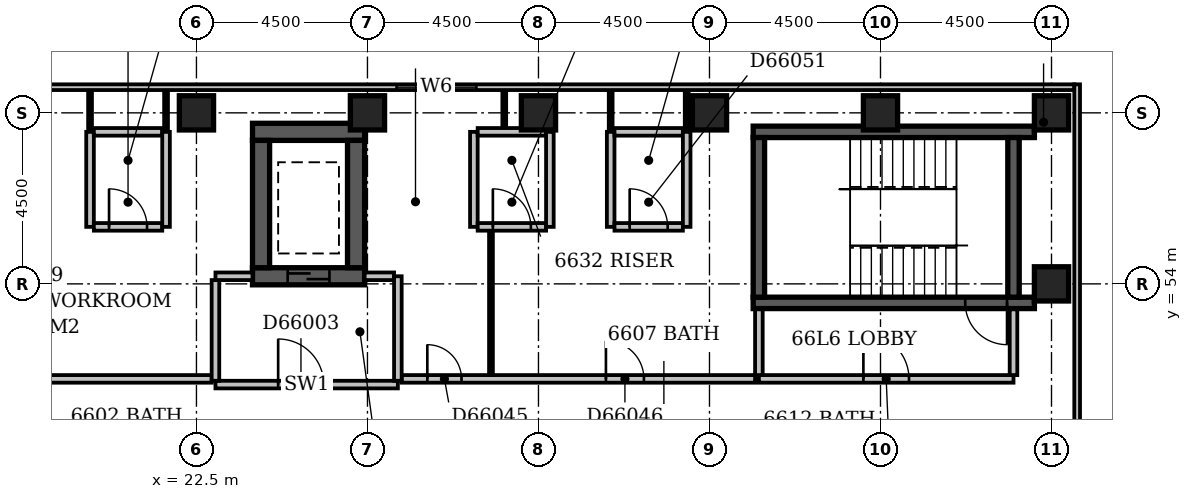
"""IFC4 building model, lengths in metres.
Left out: names, types, materials, properties, quantities, classifications, styles, units other than length and angle.
Written with IfcOpenShell. Run it as: python <this file> out.ifc"""

import sys

from ifc_helpers import new_model, si_unit, direction, frame, frame_2d, origin, origin_2d, place, context, subcontext, project, spatial, rectangle, extrude, element, fill, save


model = new_model("IFC4")
c1 = context("Model", 3, precision=1e-05, world=origin(), true_north=direction((0.0, 1.0)))
c2 = subcontext(c1, "Body", "Model", "MODEL_VIEW")
j1 = project(units=[si_unit("LENGTHUNIT", "METRE"), si_unit("PLANEANGLEUNIT", "RADIAN")], contexts=[c1])
p1 = place(None, origin())
s1 = spatial("IfcSite", under=j1, at=p1, CompositionType="ELEMENT")
p2 = place(p1, origin())
s2 = spatial("IfcBuilding", under=s1, at=p2, CompositionType="ELEMENT")
p3 = place(p2, frame((0.0, 0.0, 254.6)))
s3 = spatial("IfcBuildingStorey", under=s2, at=p3, CompositionType="ELEMENT", Elevation=254.6)
p4 = place(p3, frame((23.975, 54.2, -0.3), z_axis=(0.0, 0.0, 1.0), x_axis=(1.0, 0.0, 0.0)))
e1 = element("IfcWall", 1, at=p4, inside=s3, PredefinedType="SHEAR", context=c2, shape_type="SweptSolid", body=[
    extrude(rectangle(XDim=2.95, YDim=0.45, at=frame_2d((1.475, 0.0))), origin(), (0.0, 0.0, 1.0), 3.45),
])
p5 = place(p4, frame((0.925, 0.0, 0.3)))
e2 = element("IfcOpeningElement", 2, at=p5, cuts=e1, PredefinedType="OPENING", context=c2, shape_type="SweptSolid", body=[
    extrude(rectangle(XDim=1.1, YDim=2.1, at=frame_2d((0.55, 1.05))), frame((0.0, 0.237, 0.0), z_axis=(0.0, -1.0, 0.0), x_axis=(1.0, 0.0, 0.0)), (0.0, 0.0, 1.0), 0.474),
])
p6 = place(p3, frame((23.975, 58.0, -0.3), z_axis=(0.0, 0.0, 1.0), x_axis=(1.0, 0.0, 0.0)))
e3 = element("IfcWall", 3, at=p6, inside=s3, PredefinedType="SHEAR", context=c2, shape_type="SweptSolid", body=[
    extrude(rectangle(XDim=2.95, YDim=0.45, at=frame_2d((1.475, 0.0))), origin(), (0.0, 0.0, 1.0), 3.45),
])
for number, where, z_axis, x_axis in (
    (4, (24.2, 54.425, -0.3), (0.0, 0.0, 1.0), (0.0, 1.0, 0.0)),
    (5, (26.7, 54.425, -0.3), (0.0, 0.0, 1.0), (0.0, 1.0, 0.0)),
):
    element("IfcWall", number, at=place(p3, frame(where, z_axis=z_axis, x_axis=x_axis)), inside=s3, PredefinedType="SHEAR", context=c2, shape_type="SweptSolid", body=[
        extrude(rectangle(XDim=3.35, YDim=0.45, at=frame_2d((1.675, 0.0))), origin(), (0.0, 0.0, 1.0), 3.45),
    ])
p7 = place(p3, frame((37.15, 53.5, -0.3), z_axis=(0.0, 0.0, 1.0), x_axis=(1.0, 0.0, 0.0)))
e6 = element("IfcWall", 6, at=p7, inside=s3, PredefinedType="SHEAR", context=c2, shape_type="SweptSolid", body=[
    extrude(rectangle(XDim=7.4, YDim=0.3, at=frame_2d((3.7, 0.0))), origin(), (0.0, 0.0, 1.0), 3.45),
])
p8 = place(p7, frame((5.58, 0.0, 0.3)))
e7 = element("IfcOpeningElement", 7, at=p8, cuts=e6, PredefinedType="OPENING", context=c2, shape_type="SweptSolid", body=[
    extrude(rectangle(XDim=1.1, YDim=2.1, at=frame_2d((0.55, 1.05))), frame((0.0, 0.162, 0.0), z_axis=(0.0, -1.0, 0.0), x_axis=(1.0, 0.0, 0.0)), (0.0, 0.0, 1.0), 0.324),
])
p9 = place(p3, frame((37.15, 58.0, -0.3), z_axis=(0.0, 0.0, 1.0), x_axis=(1.0, 0.0, 0.0)))
e8 = element("IfcWall", 8, at=p9, inside=s3, PredefinedType="SHEAR", context=c2, shape_type="SweptSolid", body=[
    extrude(rectangle(XDim=7.4, YDim=0.3, at=frame_2d((3.7, 0.0))), origin(), (0.0, 0.0, 1.0), 3.45),
])
for number, where, z_axis, x_axis in (
    (9, (37.3, 53.65, -0.3), (0.0, 0.0, 1.0), (0.0, 1.0, 0.0)),
    (10, (44.0, 53.65, -0.3), (0.0, 0.0, 1.0), (0.0, 1.0, 0.0)),
):
    element("IfcWall", number, at=place(p3, frame(where, z_axis=z_axis, x_axis=x_axis)), inside=s3, PredefinedType="SHEAR", context=c2, shape_type="SweptSolid", body=[
        extrude(rectangle(XDim=4.2, YDim=0.3, at=frame_2d((2.1, 0.0))), origin(), (0.0, 0.0, 1.0), 3.45),
    ])
for number, where, z_axis, x_axis in (
    (11, (45.0, 54.0, -0.3), (0.0, 0.0, 1.0), (1.0, 0.0, 0.0)),
    (12, (22.5, 58.5, -0.3), (0.0, 0.0, 1.0), (1.0, 0.0, 0.0)),
    (13, (27.0, 58.5, -0.3), (0.0, 0.0, 1.0), (1.0, 0.0, 0.0)),
    (14, (31.5, 58.5, -0.3), (0.0, 0.0, 1.0), (1.0, 0.0, 0.0)),
    (15, (36.0, 58.5, -0.3), (0.0, 0.0, 1.0), (1.0, 0.0, 0.0)),
    (16, (40.5, 58.5, -0.3), (0.0, 0.0, 1.0), (1.0, 0.0, 0.0)),
    (17, (45.0, 58.5, -0.3), (0.0, 0.0, 1.0), (1.0, 0.0, 0.0)),
):
    element("IfcColumn", number, at=place(p3, frame(where, z_axis=z_axis, x_axis=x_axis)), inside=s3, PredefinedType="COLUMN", context=c2, shape_type="SweptSolid", body=[
        extrude(rectangle(XDim=0.9, YDim=0.9, at=origin_2d()), origin(), (0.0, 0.0, 1.0), 3.45),
    ])
p10 = place(p3, frame((45.675, 39.9, 0.0), z_axis=(0.0, 0.0, 1.0), x_axis=(0.0, 1.0, 0.0)))
e18 = element("IfcWall", 18, at=p10, inside=s3, PredefinedType="STANDARD", context=c2, shape_type="SweptSolid", body=[
    extrude(rectangle(XDim=19.35, YDim=0.15, at=frame_2d((9.675, 0.0))), origin(), (0.0, 0.0, 1.0), 2.7),
])
p11 = place(p10, frame((1.65, 0.0, 0.6)))
e19 = element("IfcOpeningElement", 19, at=p11, cuts=e18, PredefinedType="OPENING", context=c2, shape_type="SweptSolid", body=[
    extrude(rectangle(XDim=2.4, YDim=1.8, at=frame_2d((1.2, 0.9))), frame((0.0, 0.087, 0.0), z_axis=(0.0, -1.0, 0.0), x_axis=(1.0, 0.0, 0.0)), (0.0, 0.0, 1.0), 0.174),
])
p12 = place(p10, frame((6.15, 0.0, 0.6)))
e20 = element("IfcOpeningElement", 20, at=p12, cuts=e18, PredefinedType="OPENING", context=c2, shape_type="SweptSolid", body=[
    extrude(rectangle(XDim=2.4, YDim=1.8, at=frame_2d((1.2, 0.9))), frame((0.0, 0.087, 0.0), z_axis=(0.0, -1.0, 0.0), x_axis=(1.0, 0.0, 0.0)), (0.0, 0.0, 1.0), 0.174),
])
p13 = place(p3, frame((45.6, 59.175, 0.0), z_axis=(0.0, 0.0, 1.0), x_axis=(-1.0, 0.0, 0.0)))
e21 = element("IfcWall", 21, at=p13, inside=s3, PredefinedType="STANDARD", context=c2, shape_type="SweptSolid", body=[
    extrude(rectangle(XDim=46.35, YDim=0.15, at=frame_2d((23.175, 0.0))), origin(), (0.0, 0.0, 1.0), 2.7),
])
p14 = place(p13, frame((15.734, 0.0, 0.6)))
e22 = element("IfcOpeningElement", 22, at=p14, cuts=e21, PredefinedType="OPENING", context=c2, shape_type="SweptSolid", body=[
    extrude(rectangle(XDim=2.1, YDim=1.8, at=frame_2d((1.05, 0.9))), frame((0.0, 0.087, 0.0), z_axis=(0.0, -1.0, 0.0), x_axis=(1.0, 0.0, 0.0)), (0.0, 0.0, 1.0), 0.174),
])
p15 = place(p3, frame((23.0, 51.35, 0.0), z_axis=(0.0, 0.0, 1.0), x_axis=(1.0, 0.0, 0.0)))
e23 = element("IfcWall", 23, at=p15, inside=s3, PredefinedType="PARTITIONING", context=c2, shape_type="SweptSolid", body=[
    extrude(rectangle(XDim=4.8, YDim=0.2, at=frame_2d((2.4, 0.0))), origin(), (0.0, 0.0, 1.0), 3.15),
])
p16 = place(p15, frame((1.65, 0.0, 0.0)))
e24 = element("IfcOpeningElement", 24, at=p16, cuts=e23, PredefinedType="OPENING", context=c2, shape_type="SweptSolid", body=[
    extrude(rectangle(XDim=1.2, YDim=2.1, at=frame_2d((0.6, 1.05))), frame((0.0, 0.112, 0.0), z_axis=(0.0, -1.0, 0.0), x_axis=(1.0, 0.0, 0.0)), (0.0, 0.0, 1.0), 0.224),
])
p17 = place(p3, frame((27.8, 51.45, 0.0), z_axis=(0.0, 0.0, 1.0), x_axis=(0.0, 1.0, 0.0)))
e25 = element("IfcWall", 25, at=p17, inside=s3, PredefinedType="PARTITIONING", context=c2, shape_type="SweptSolid", body=[
    extrude(rectangle(XDim=2.75, YDim=0.2, at=frame_2d((1.375, 0.0))), origin(), (0.0, 0.0, 1.0), 3.15),
])
p18 = place(p3, frame((23.0, 54.2, 0.0), z_axis=(0.0, 0.0, 1.0), x_axis=(1.0, 0.0, 0.0)))
e26 = element("IfcWall", 26, at=p18, inside=s3, PredefinedType="PARTITIONING", context=c2, shape_type="SweptSolid", body=[
    extrude(rectangle(XDim=0.975, YDim=0.2, at=frame_2d((0.488, 0.0))), origin(), (0.0, 0.0, 1.0), 3.15),
])
p19 = place(p3, frame((26.925, 54.2, 0.0), z_axis=(0.0, 0.0, 1.0), x_axis=(1.0, 0.0, 0.0)))
e27 = element("IfcWall", 27, at=p19, inside=s3, PredefinedType="PARTITIONING", context=c2, shape_type="SweptSolid", body=[
    extrude(rectangle(XDim=0.775, YDim=0.2, at=frame_2d((0.387, 0.0))), origin(), (0.0, 0.0, 1.0), 3.15),
])
p20 = place(p3, frame((23.0, 51.45, 0.0), z_axis=(0.0, 0.0, 1.0), x_axis=(0.0, 1.0, 0.0)))
e28 = element("IfcWall", 28, at=p20, inside=s3, PredefinedType="PARTITIONING", context=c2, shape_type="SweptSolid", body=[
    extrude(rectangle(XDim=2.65, YDim=0.2, at=frame_2d((1.325, 0.0))), origin(), (0.0, 0.0, 1.0), 3.15),
])
p21 = place(p3, frame((37.3, 51.5, 0.0), z_axis=(0.0, 0.0, 1.0), x_axis=(1.0, 0.0, 0.0)))
e29 = element("IfcWall", 29, at=p21, inside=s3, PredefinedType="PARTITIONING", context=c2, shape_type="SweptSolid", body=[
    extrude(rectangle(XDim=6.7, YDim=0.2, at=frame_2d((3.35, 0.0))), origin(), (0.0, 0.0, 1.0), 3.15),
])
p22 = place(p21, frame((2.75, 0.0, 0.0)))
e30 = element("IfcOpeningElement", 30, at=p22, cuts=e29, PredefinedType="OPENING", context=c2, shape_type="SweptSolid", body=[
    extrude(rectangle(XDim=1.2, YDim=2.1, at=frame_2d((0.6, 1.05))), frame((0.0, 0.112, 0.0), z_axis=(0.0, -1.0, 0.0), x_axis=(1.0, 0.0, 0.0)), (0.0, 0.0, 1.0), 0.224),
])
for number, where, z_axis, x_axis in (
    (31, (44.0, 51.6, 0.0), (0.0, 0.0, 1.0), (0.0, 1.0, 0.0)),
    (32, (37.3, 51.6, 0.0), (0.0, 0.0, 1.0), (0.0, 1.0, 0.0)),
):
    element("IfcWall", number, at=place(p3, frame(where, z_axis=z_axis, x_axis=x_axis)), inside=s3, PredefinedType="PARTITIONING", context=c2, shape_type="SweptSolid", body=[
        extrude(rectangle(XDim=1.73, YDim=0.2, at=frame_2d((0.865, 0.0))), origin(), (0.0, 0.0, 1.0), 3.15),
    ])
p23 = place(p3, frame((7.6, 51.5, 0.0), z_axis=(0.0, 0.0, 1.0), x_axis=(1.0, 0.0, 0.0)))
e33 = element("IfcWall", 33, at=p23, inside=s3, PredefinedType="PARTITIONING", context=c2, shape_type="SweptSolid", body=[
    extrude(rectangle(XDim=15.3, YDim=0.2, at=frame_2d((7.65, 0.0))), origin(), (0.0, 0.0, 1.0), 3.15),
])
p24 = place(p23, frame((2.075, 0.0, 0.0)))
e34 = element("IfcOpeningElement", 34, at=p24, cuts=e33, PredefinedType="OPENING", context=c2, shape_type="SweptSolid", body=[
    extrude(rectangle(XDim=1.0, YDim=2.1, at=frame_2d((0.5, 1.05))), frame((0.0, 0.112, 0.0), z_axis=(0.0, -1.0, 0.0), x_axis=(1.0, 0.0, 0.0)), (0.0, 0.0, 1.0), 0.224),
])
p25 = place(p23, frame((9.875, 0.0, 0.0)))
e35 = element("IfcOpeningElement", 35, at=p25, cuts=e33, PredefinedType="OPENING", context=c2, shape_type="SweptSolid", body=[
    extrude(rectangle(XDim=0.9, YDim=2.1, at=frame_2d((0.45, 1.05))), frame((0.0, 0.112, 0.0), z_axis=(0.0, -1.0, 0.0), x_axis=(1.0, 0.0, 0.0)), (0.0, 0.0, 1.0), 0.224),
])
p26 = place(p3, frame((27.9, 51.5, 0.0), z_axis=(0.0, 0.0, 1.0), x_axis=(1.0, 0.0, 0.0)))
e36 = element("IfcWall", 36, at=p26, inside=s3, PredefinedType="PARTITIONING", context=c2, shape_type="SweptSolid", body=[
    extrude(rectangle(XDim=9.3, YDim=0.2, at=frame_2d((4.65, 0.0))), origin(), (0.0, 0.0, 1.0), 3.15),
])
p27 = place(p26, frame((0.675, 0.0, 0.0)))
e37 = element("IfcOpeningElement", 37, at=p27, cuts=e36, PredefinedType="OPENING", context=c2, shape_type="SweptSolid", body=[
    extrude(rectangle(XDim=0.9, YDim=2.1, at=frame_2d((0.45, 1.05))), frame((0.0, 0.112, 0.0), z_axis=(0.0, -1.0, 0.0), x_axis=(1.0, 0.0, 0.0)), (0.0, 0.0, 1.0), 0.224),
])
p28 = place(p26, frame((5.375, 0.0, 0.0)))
e38 = element("IfcOpeningElement", 38, at=p28, cuts=e36, PredefinedType="OPENING", context=c2, shape_type="SweptSolid", body=[
    extrude(rectangle(XDim=1.0, YDim=2.1, at=frame_2d((0.5, 1.05))), frame((0.0, 0.112, 0.0), z_axis=(0.0, -1.0, 0.0), x_axis=(1.0, 0.0, 0.0)), (0.0, 0.0, 1.0), 0.224),
])
p29 = place(p3, frame((30.25, 51.6, 0.0), z_axis=(0.0, 0.0, 1.0), x_axis=(0.0, 1.0, 0.0)))
e39 = element("IfcWall", 39, at=p29, inside=s3, PredefinedType="PARTITIONING", context=c2, shape_type="SweptSolid", body=[
    extrude(rectangle(XDim=3.8, YDim=0.1, at=frame_2d((1.9, 0.0))), origin(), (0.0, 0.0, 1.0), 3.15),
])
p30 = place(p3, frame((19.7, 55.5, 0.0), z_axis=(0.0, 0.0, 1.0), x_axis=(0.0, 1.0, 0.0)))
e40 = element("IfcWall", 40, at=p30, inside=s3, PredefinedType="PARTITIONING", context=c2, shape_type="SweptSolid", body=[
    extrude(rectangle(XDim=2.5, YDim=0.2, at=frame_2d((1.25, 0.0))), origin(), (0.0, 0.0, 1.0), 3.15),
])
p31 = place(p3, frame((19.8, 55.5, 0.0), z_axis=(0.0, 0.0, 1.0), x_axis=(1.0, 0.0, 0.0)))
e41 = element("IfcWall", 41, at=p31, inside=s3, PredefinedType="PARTITIONING", context=c2, shape_type="SweptSolid", body=[
    extrude(rectangle(XDim=1.8, YDim=0.2, at=frame_2d((0.9, 0.0))), origin(), (0.0, 0.0, 1.0), 3.15),
])
p32 = place(p31, frame((0.4, 0.0, 0.0)))
e42 = element("IfcOpeningElement", 42, at=p32, cuts=e41, PredefinedType="OPENING", context=c2, shape_type="SweptSolid", body=[
    extrude(rectangle(XDim=1.0, YDim=2.1, at=frame_2d((0.5, 1.05))), frame((0.0, 0.112, 0.0), z_axis=(0.0, -1.0, 0.0), x_axis=(1.0, 0.0, 0.0)), (0.0, 0.0, 1.0), 0.224),
])
for number, where, z_axis, x_axis in (
    (43, (21.7, 55.5, 0.0), (0.0, 0.0, 1.0), (0.0, 1.0, 0.0)),
    (44, (29.8, 55.5, 0.0), (0.0, 0.0, 1.0), (0.0, 1.0, 0.0)),
):
    element("IfcWall", number, at=place(p3, frame(where, z_axis=z_axis, x_axis=x_axis)), inside=s3, PredefinedType="PARTITIONING", context=c2, shape_type="SweptSolid", body=[
        extrude(rectangle(XDim=2.5, YDim=0.2, at=frame_2d((1.25, 0.0))), origin(), (0.0, 0.0, 1.0), 3.15),
    ])
p33 = place(p3, frame((29.9, 55.5, 0.0), z_axis=(0.0, 0.0, 1.0), x_axis=(1.0, 0.0, 0.0)))
e45 = element("IfcWall", 45, at=p33, inside=s3, PredefinedType="PARTITIONING", context=c2, shape_type="SweptSolid", body=[
    extrude(rectangle(XDim=1.8, YDim=0.2, at=frame_2d((0.9, 0.0))), origin(), (0.0, 0.0, 1.0), 3.15),
])
p34 = place(p33, frame((0.4, 0.0, 0.0)))
e46 = element("IfcOpeningElement", 46, at=p34, cuts=e45, PredefinedType="OPENING", context=c2, shape_type="SweptSolid", body=[
    extrude(rectangle(XDim=1.0, YDim=2.1, at=frame_2d((0.5, 1.05))), frame((0.0, 0.112, 0.0), z_axis=(0.0, -1.0, 0.0), x_axis=(1.0, 0.0, 0.0)), (0.0, 0.0, 1.0), 0.224),
])
for number, where, z_axis, x_axis in (
    (47, (31.8, 55.5, 0.0), (0.0, 0.0, 1.0), (0.0, 1.0, 0.0)),
    (48, (33.4, 55.5, 0.0), (0.0, 0.0, 1.0), (0.0, 1.0, 0.0)),
):
    element("IfcWall", number, at=place(p3, frame(where, z_axis=z_axis, x_axis=x_axis)), inside=s3, PredefinedType="PARTITIONING", context=c2, shape_type="SweptSolid", body=[
        extrude(rectangle(XDim=2.5, YDim=0.2, at=frame_2d((1.25, 0.0))), origin(), (0.0, 0.0, 1.0), 3.15),
    ])
p35 = place(p3, frame((33.5, 55.5, 0.0), z_axis=(0.0, 0.0, 1.0), x_axis=(1.0, 0.0, 0.0)))
e49 = element("IfcWall", 49, at=p35, inside=s3, PredefinedType="PARTITIONING", context=c2, shape_type="SweptSolid", body=[
    extrude(rectangle(XDim=1.8, YDim=0.2, at=frame_2d((0.9, 0.0))), origin(), (0.0, 0.0, 1.0), 3.15),
])
p36 = place(p35, frame((0.4, 0.0, 0.0)))
e50 = element("IfcOpeningElement", 50, at=p36, cuts=e49, PredefinedType="OPENING", context=c2, shape_type="SweptSolid", body=[
    extrude(rectangle(XDim=1.0, YDim=2.1, at=frame_2d((0.5, 1.05))), frame((0.0, 0.112, 0.0), z_axis=(0.0, -1.0, 0.0), x_axis=(1.0, 0.0, 0.0)), (0.0, 0.0, 1.0), 0.224),
])
p37 = place(p3, frame((35.4, 55.5, 0.0), z_axis=(0.0, 0.0, 1.0), x_axis=(0.0, 1.0, 0.0)))
e51 = element("IfcWall", 51, at=p37, inside=s3, PredefinedType="PARTITIONING", context=c2, shape_type="SweptSolid", body=[
    extrude(rectangle(XDim=2.5, YDim=0.2, at=frame_2d((1.25, 0.0))), origin(), (0.0, 0.0, 1.0), 3.15),
])
p38 = place(p3, frame((19.7, 58.0, 0.0), z_axis=(0.0, 0.0, 1.0), x_axis=(0.0, 1.0, 0.0)))
e52 = element("IfcWall", 52, at=p38, inside=s3, PredefinedType="PARTITIONING", context=c2, shape_type="SweptSolid", body=[
    extrude(rectangle(XDim=1.1, YDim=0.1, at=frame_2d((0.55, 0.0))), origin(), (0.0, 0.0, 1.0), 3.15),
])
p39 = place(p3, frame((19.8, 58.0, 0.0), z_axis=(0.0, 0.0, 1.0), x_axis=(1.0, 0.0, 0.0)))
e53 = element("IfcWall", 53, at=p39, inside=s3, PredefinedType="PARTITIONING", context=c2, shape_type="SweptSolid", body=[
    extrude(rectangle(XDim=1.8, YDim=0.2, at=frame_2d((0.9, 0.0))), origin(), (0.0, 0.0, 1.0), 3.15),
])
p40 = place(p3, frame((21.7, 58.0, 0.0), z_axis=(0.0, 0.0, 1.0), x_axis=(0.0, 1.0, 0.0)))
e54 = element("IfcWall", 54, at=p40, inside=s3, PredefinedType="PARTITIONING", context=c2, shape_type="SweptSolid", body=[
    extrude(rectangle(XDim=1.1, YDim=0.1, at=frame_2d((0.55, 0.0))), origin(), (0.0, 0.0, 1.0), 3.15),
])
p41 = place(p3, frame((29.9, 58.0, 0.0), z_axis=(0.0, 0.0, 1.0), x_axis=(1.0, 0.0, 0.0)))
e55 = element("IfcWall", 55, at=p41, inside=s3, PredefinedType="PARTITIONING", context=c2, shape_type="SweptSolid", body=[
    extrude(rectangle(XDim=1.8, YDim=0.2, at=frame_2d((0.9, 0.0))), origin(), (0.0, 0.0, 1.0), 3.15),
])
p42 = place(p3, frame((33.4, 58.0, 0.0), z_axis=(0.0, 0.0, 1.0), x_axis=(0.0, 1.0, 0.0)))
e56 = element("IfcWall", 56, at=p42, inside=s3, PredefinedType="PARTITIONING", context=c2, shape_type="SweptSolid", body=[
    extrude(rectangle(XDim=1.1, YDim=0.1, at=frame_2d((0.55, 0.0))), origin(), (0.0, 0.0, 1.0), 3.15),
])
p43 = place(p3, frame((33.5, 58.0, 0.0), z_axis=(0.0, 0.0, 1.0), x_axis=(1.0, 0.0, 0.0)))
e57 = element("IfcWall", 57, at=p43, inside=s3, PredefinedType="PARTITIONING", context=c2, shape_type="SweptSolid", body=[
    extrude(rectangle(XDim=1.8, YDim=0.2, at=frame_2d((0.9, 0.0))), origin(), (0.0, 0.0, 1.0), 3.15),
])
p44 = place(p3, frame((35.4, 58.0, 0.0), z_axis=(0.0, 0.0, 1.0), x_axis=(0.0, 1.0, 0.0)))
e58 = element("IfcWall", 58, at=p44, inside=s3, PredefinedType="PARTITIONING", context=c2, shape_type="SweptSolid", body=[
    extrude(rectangle(XDim=1.1, YDim=0.1, at=frame_2d((0.55, 0.0))), origin(), (0.0, 0.0, 1.0), 3.15),
])
p45 = place(p3, frame((30.6, 58.1, 0.0), z_axis=(0.0, 0.0, 1.0), x_axis=(0.0, 1.0, 0.0)))
e59 = element("IfcWall", 59, at=p45, inside=s3, PredefinedType="PARTITIONING", context=c2, shape_type="SweptSolid", body=[
    extrude(rectangle(XDim=1.0, YDim=0.1, at=frame_2d((0.5, 0.0))), origin(), (0.0, 0.0, 1.0), 3.15),
])
p46 = place(p14, origin())
e60 = element("IfcWindow", 60, at=p46, inside=s3, PartitioningType="SINGLE_PANEL", PredefinedType="WINDOW", context=c2, shape_type="SweptSolid", body=[
    extrude(rectangle(XDim=2.1, YDim=1.8, at=frame_2d((1.05, 0.9))), frame((0.0, 0.03, 0.0), z_axis=(0.0, -1.0, 0.0), x_axis=(1.0, 0.0, 0.0)), (0.0, 0.0, 1.0), 0.06),
])
fill(e22, e60)
p47 = place(p16, origin())
e61 = element("IfcDoor", 61, at=p47, inside=s3, OperationType="SINGLE_SWING_LEFT", PredefinedType="DOOR", context=c2, shape_type="SweptSolid", body=[
    extrude(rectangle(XDim=1.2, YDim=2.1, at=frame_2d((0.6, 1.05))), frame((0.0, 0.025, 0.0), z_axis=(0.0, -1.0, 0.0), x_axis=(1.0, 0.0, 0.0)), (0.0, 0.0, 1.0), 0.05),
])
fill(e24, e61)
p48 = place(p5, origin())
e62 = element("IfcDoor", 62, at=p48, inside=s3, OperationType="SLIDING_TO_LEFT", PredefinedType="DOOR", context=c2, shape_type="SweptSolid", body=[
    extrude(rectangle(XDim=1.1, YDim=2.1, at=frame_2d((0.55, 1.05))), frame((0.0, 0.025, 0.0), z_axis=(0.0, -1.0, 0.0), x_axis=(1.0, 0.0, 0.0)), (0.0, 0.0, 1.0), 0.05),
])
fill(e2, e62)
p49 = place(p22, origin())
e63 = element("IfcDoor", 63, at=p49, inside=s3, OperationType="SINGLE_SWING_LEFT", PredefinedType="DOOR", context=c2, shape_type="SweptSolid", body=[
    extrude(rectangle(XDim=1.2, YDim=2.1, at=frame_2d((0.6, 1.05))), frame((0.0, 0.025, 0.0), z_axis=(0.0, -1.0, 0.0), x_axis=(1.0, 0.0, 0.0)), (0.0, 0.0, 1.0), 0.05),
])
fill(e30, e63)
p50 = place(p8, origin())
e64 = element("IfcDoor", 64, at=p50, inside=s3, OperationType="SINGLE_SWING_RIGHT", PredefinedType="DOOR", context=c2, shape_type="SweptSolid", body=[
    extrude(rectangle(XDim=1.1, YDim=2.1, at=frame_2d((0.55, 1.05))), frame((0.0, 0.025, 0.0), z_axis=(0.0, -1.0, 0.0), x_axis=(1.0, 0.0, 0.0)), (0.0, 0.0, 1.0), 0.05),
])
fill(e7, e64)
p51 = place(p27, origin())
e65 = element("IfcDoor", 65, at=p51, inside=s3, OperationType="SINGLE_SWING_LEFT", PredefinedType="DOOR", context=c2, shape_type="SweptSolid", body=[
    extrude(rectangle(XDim=0.9, YDim=2.1, at=frame_2d((0.45, 1.05))), frame((0.0, 0.025, 0.0), z_axis=(0.0, -1.0, 0.0), x_axis=(1.0, 0.0, 0.0)), (0.0, 0.0, 1.0), 0.05),
])
fill(e37, e65)
p52 = place(p28, origin())
e66 = element("IfcDoor", 66, at=p52, inside=s3, OperationType="SINGLE_SWING_LEFT", PredefinedType="DOOR", context=c2, shape_type="SweptSolid", body=[
    extrude(rectangle(XDim=1.0, YDim=2.1, at=frame_2d((0.5, 1.05))), frame((0.0, 0.025, 0.0), z_axis=(0.0, -1.0, 0.0), x_axis=(1.0, 0.0, 0.0)), (0.0, 0.0, 1.0), 0.05),
])
fill(e38, e66)
p53 = place(p32, origin())
e67 = element("IfcDoor", 67, at=p53, inside=s3, OperationType="SINGLE_SWING_LEFT", PredefinedType="DOOR", context=c2, shape_type="SweptSolid", body=[
    extrude(rectangle(XDim=1.0, YDim=2.1, at=frame_2d((0.5, 1.05))), frame((0.0, 0.025, 0.0), z_axis=(0.0, -1.0, 0.0), x_axis=(1.0, 0.0, 0.0)), (0.0, 0.0, 1.0), 0.05),
])
fill(e42, e67)
p54 = place(p34, origin())
e68 = element("IfcDoor", 68, at=p54, inside=s3, OperationType="SINGLE_SWING_LEFT", PredefinedType="DOOR", context=c2, shape_type="SweptSolid", body=[
    extrude(rectangle(XDim=1.0, YDim=2.1, at=frame_2d((0.5, 1.05))), frame((0.0, 0.025, 0.0), z_axis=(0.0, -1.0, 0.0), x_axis=(1.0, 0.0, 0.0)), (0.0, 0.0, 1.0), 0.05),
])
fill(e46, e68)
p55 = place(p36, origin())
e69 = element("IfcDoor", 69, at=p55, inside=s3, OperationType="SINGLE_SWING_LEFT", PredefinedType="DOOR", context=c2, shape_type="SweptSolid", body=[
    extrude(rectangle(XDim=1.0, YDim=2.1, at=frame_2d((0.5, 1.05))), frame((0.0, 0.025, 0.0), z_axis=(0.0, -1.0, 0.0), x_axis=(1.0, 0.0, 0.0)), (0.0, 0.0, 1.0), 0.05),
])
fill(e50, e69)
save(model, sys.argv[1])
